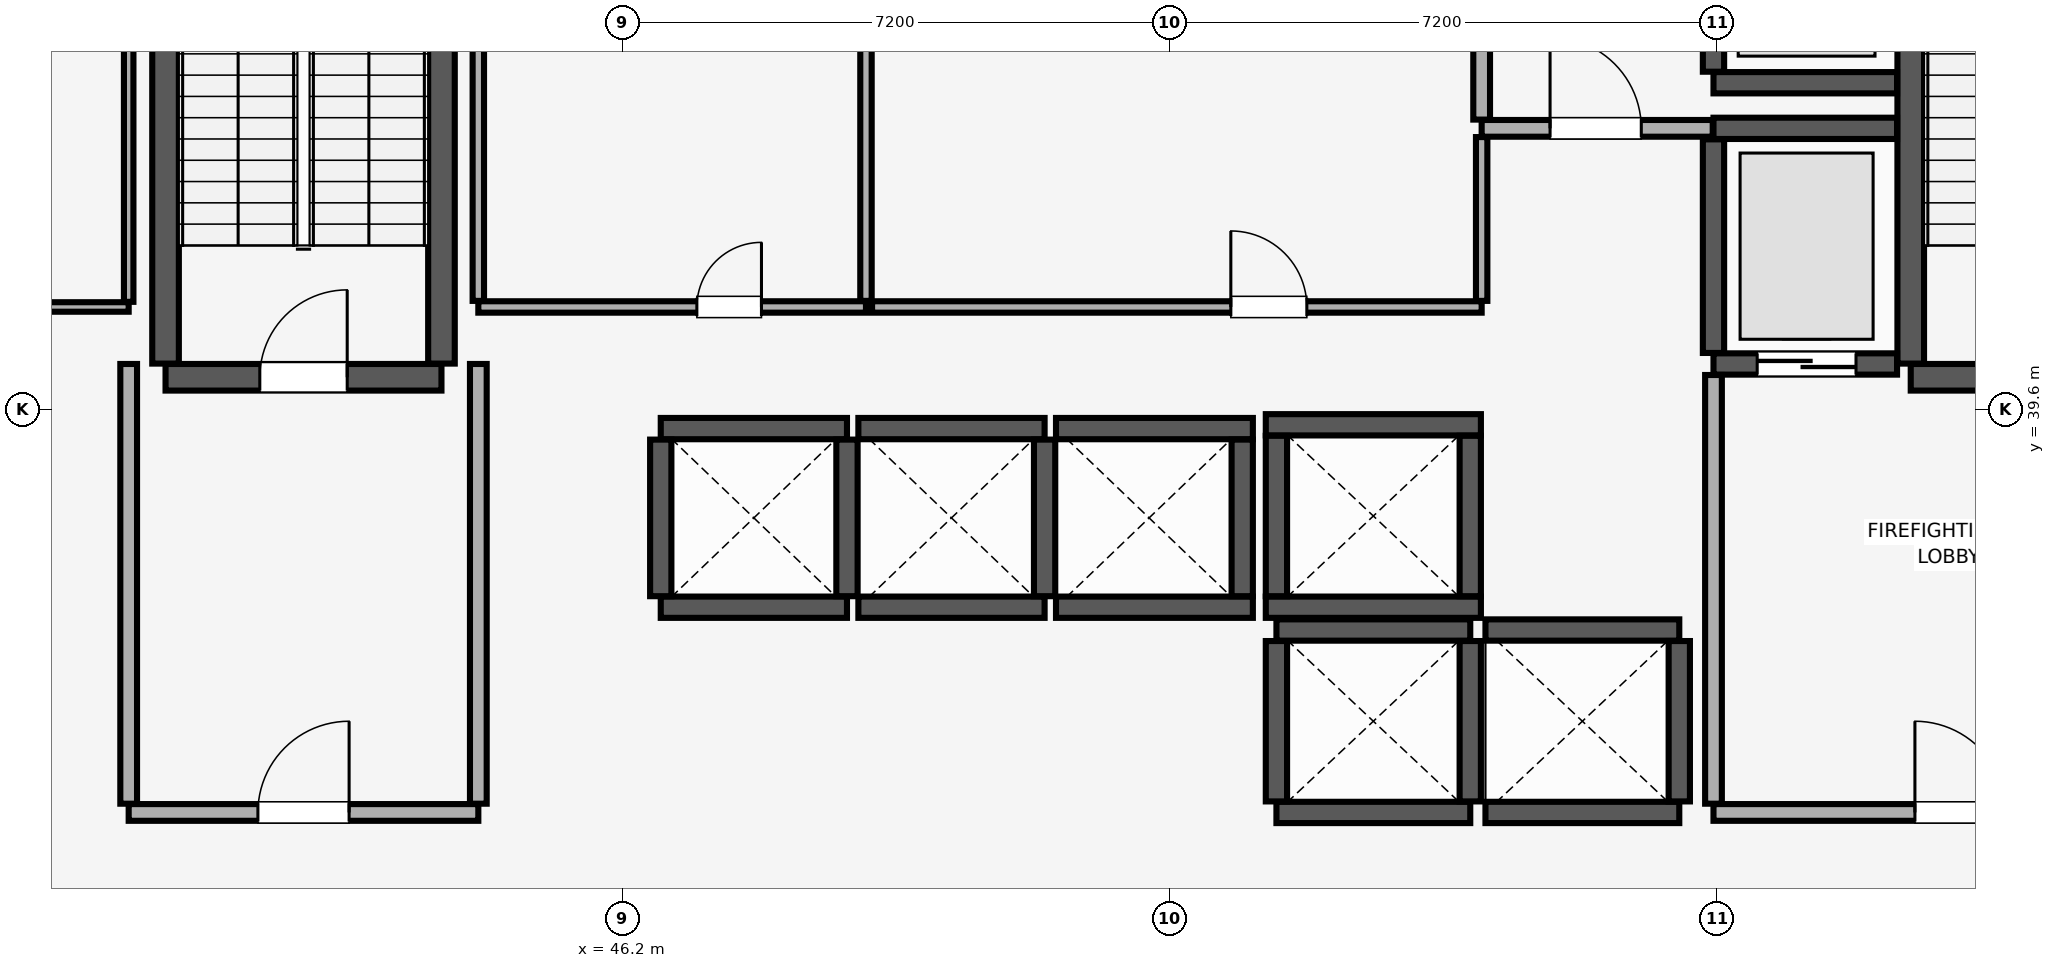
"""IFC4 building model, lengths in metres.
Left out: names, types, materials, properties, quantities, classifications, styles, units other than length and angle.
Written with IfcOpenShell. Run it as: python <this file> out.ifc"""

import sys

from ifc_helpers import new_model, si_unit, direction, frame, frame_2d, origin, place, context, subcontext, project, spatial, rectangle, extrude, element, fill, save


model = new_model("IFC4")
c1 = context("Model", 3, precision=1e-05, world=origin(), true_north=direction((0.0, 1.0)))
c2 = subcontext(c1, "Body", "Model", "MODEL_VIEW")
j1 = project(units=[si_unit("LENGTHUNIT", "METRE"), si_unit("PLANEANGLEUNIT", "RADIAN")], contexts=[c1])
p1 = place(None, origin())
s1 = spatial("IfcSite", under=j1, at=p1, CompositionType="ELEMENT")
p2 = place(p1, origin())
s2 = spatial("IfcBuilding", under=s1, at=p2, CompositionType="ELEMENT")
p3 = place(p2, frame((0.0, 0.0, 57.65)))
s3 = spatial("IfcBuildingStorey", under=s2, at=p3, CompositionType="ELEMENT", Elevation=57.65)
p4 = place(p3, frame((40.185, 40.025, 0.0), z_axis=(0.0, 0.0, 1.0), x_axis=(1.0, 0.0, 0.0)))
e1 = element("IfcWall", 1, at=p4, inside=s3, PredefinedType="SHEAR", context=c2, shape_type="SweptSolid", body=[
    extrude(rectangle(XDim=3.63, YDim=0.35, at=frame_2d((1.815, 0.0))), origin(), (0.0, 0.0, 1.0), 3.51),
])
p5 = place(p4, frame((1.24, 0.0, 0.0)))
e2 = element("IfcOpeningElement", 2, at=p5, cuts=e1, PredefinedType="OPENING", context=c2, shape_type="SweptSolid", body=[
    extrude(rectangle(XDim=1.15, YDim=2.15, at=frame_2d((0.575, 1.075))), frame((0.0, 0.185, 0.0), z_axis=(0.0, -1.0, 0.0), x_axis=(1.0, 0.0, 0.0)), (0.0, 0.0, 1.0), 0.37),
])
for number, where, z_axis, x_axis in (
    (3, (40.185, 40.205, 0.0), (0.0, 0.0, 1.0), (0.0, 1.0, 0.0)),
    (4, (43.815, 40.205, 0.0), (0.0, 0.0, 1.0), (0.0, 1.0, 0.0)),
):
    element("IfcWall", number, at=place(p3, frame(where, z_axis=z_axis, x_axis=x_axis)), inside=s3, PredefinedType="SHEAR", context=c2, shape_type="SweptSolid", body=[
        extrude(rectangle(XDim=8.09, YDim=0.35, at=frame_2d((4.045, 0.0))), origin(), (0.0, 0.0, 1.0), 3.51),
    ])
p6 = place(p3, frame((63.145, 40.025, 0.0), z_axis=(0.0, 0.0, 1.0), x_axis=(1.0, 0.0, 0.0)))
e5 = element("IfcWall", 5, at=p6, inside=s3, PredefinedType="SHEAR", context=c2, shape_type="SweptSolid", body=[
    extrude(rectangle(XDim=4.1, YDim=0.35, at=frame_2d((2.05, 0.0))), origin(), (0.0, 0.0, 1.0), 3.51),
])
p7 = place(p6, frame((1.24, 0.0, 0.0)))
e6 = element("IfcOpeningElement", 6, at=p7, cuts=e5, PredefinedType="OPENING", context=c2, shape_type="SweptSolid", body=[
    extrude(rectangle(XDim=1.15, YDim=2.15, at=frame_2d((0.575, 1.075))), frame((0.0, 0.185, 0.0), z_axis=(0.0, -1.0, 0.0), x_axis=(1.0, 0.0, 0.0)), (0.0, 0.0, 1.0), 0.37),
])
p8 = place(p3, frame((63.145, 40.205, 0.0), z_axis=(0.0, 0.0, 1.0), x_axis=(0.0, 1.0, 0.0)))
e7 = element("IfcWall", 7, at=p8, inside=s3, PredefinedType="SHEAR", context=c2, shape_type="SweptSolid", body=[
    extrude(rectangle(XDim=8.09, YDim=0.35, at=frame_2d((4.045, 0.0))), origin(), (0.0, 0.0, 1.0), 3.51),
])
for number, where, z_axis, x_axis in (
    (8, (46.7, 37.0, 0.0), (0.0, 0.0, 1.0), (1.0, 0.0, 0.0)),
    (9, (46.7, 39.35, 0.0), (0.0, 0.0, 1.0), (1.0, 0.0, 0.0)),
):
    element("IfcWall", number, at=place(p3, frame(where, z_axis=z_axis, x_axis=x_axis)), inside=s3, PredefinedType="SHEAR", context=c2, shape_type="SweptSolid", body=[
        extrude(rectangle(XDim=2.45, YDim=0.28, at=frame_2d((1.225, 0.0))), origin(), (0.0, 0.0, 1.0), 3.51),
    ])
for number, where, z_axis, x_axis in (
    (10, (46.7, 37.145, 0.0), (0.0, 0.0, 1.0), (0.0, 1.0, 0.0)),
    (11, (49.15, 37.145, 0.0), (0.0, 0.0, 1.0), (0.0, 1.0, 0.0)),
):
    element("IfcWall", number, at=place(p3, frame(where, z_axis=z_axis, x_axis=x_axis)), inside=s3, PredefinedType="SHEAR", context=c2, shape_type="SweptSolid", body=[
        extrude(rectangle(XDim=2.06, YDim=0.28, at=frame_2d((1.03, 0.0))), origin(), (0.0, 0.0, 1.0), 3.51),
    ])
for number, where, z_axis, x_axis in (
    (12, (49.3, 37.0, 0.0), (0.0, 0.0, 1.0), (1.0, 0.0, 0.0)),
    (13, (49.3, 39.35, 0.0), (0.0, 0.0, 1.0), (1.0, 0.0, 0.0)),
):
    element("IfcWall", number, at=place(p3, frame(where, z_axis=z_axis, x_axis=x_axis)), inside=s3, PredefinedType="SHEAR", context=c2, shape_type="SweptSolid", body=[
        extrude(rectangle(XDim=2.45, YDim=0.28, at=frame_2d((1.225, 0.0))), origin(), (0.0, 0.0, 1.0), 3.51),
    ])
p9 = place(p3, frame((51.75, 37.145, 0.0), z_axis=(0.0, 0.0, 1.0), x_axis=(0.0, 1.0, 0.0)))
e14 = element("IfcWall", 14, at=p9, inside=s3, PredefinedType="SHEAR", context=c2, shape_type="SweptSolid", body=[
    extrude(rectangle(XDim=2.06, YDim=0.28, at=frame_2d((1.03, 0.0))), origin(), (0.0, 0.0, 1.0), 3.51),
])
for number, where, z_axis, x_axis in (
    (15, (51.9, 37.0, 0.0), (0.0, 0.0, 1.0), (1.0, 0.0, 0.0)),
    (16, (51.9, 39.35, 0.0), (0.0, 0.0, 1.0), (1.0, 0.0, 0.0)),
):
    element("IfcWall", number, at=place(p3, frame(where, z_axis=z_axis, x_axis=x_axis)), inside=s3, PredefinedType="SHEAR", context=c2, shape_type="SweptSolid", body=[
        extrude(rectangle(XDim=2.59, YDim=0.28, at=frame_2d((1.295, 0.0))), origin(), (0.0, 0.0, 1.0), 3.51),
    ])
p10 = place(p3, frame((54.35, 37.145, 0.0), z_axis=(0.0, 0.0, 1.0), x_axis=(0.0, 1.0, 0.0)))
e17 = element("IfcWall", 17, at=p10, inside=s3, PredefinedType="SHEAR", context=c2, shape_type="SweptSolid", body=[
    extrude(rectangle(XDim=2.06, YDim=0.28, at=frame_2d((1.03, 0.0))), origin(), (0.0, 0.0, 1.0), 3.51),
])
for number, where, z_axis, x_axis in (
    (18, (54.8, 34.3, 0.0), (0.0, 0.0, 1.0), (1.0, 0.0, 0.0)),
    (19, (54.8, 36.7, 0.0), (0.0, 0.0, 1.0), (1.0, 0.0, 0.0)),
):
    element("IfcWall", number, at=place(p3, frame(where, z_axis=z_axis, x_axis=x_axis)), inside=s3, PredefinedType="SHEAR", context=c2, shape_type="SweptSolid", body=[
        extrude(rectangle(XDim=2.55, YDim=0.28, at=frame_2d((1.275, 0.0))), origin(), (0.0, 0.0, 1.0), 3.51),
    ])
for number, where, z_axis, x_axis in (
    (20, (54.8, 34.445, 0.0), (0.0, 0.0, 1.0), (0.0, 1.0, 0.0)),
    (21, (57.35, 34.445, 0.0), (0.0, 0.0, 1.0), (0.0, 1.0, 0.0)),
):
    element("IfcWall", number, at=place(p3, frame(where, z_axis=z_axis, x_axis=x_axis)), inside=s3, PredefinedType="SHEAR", context=c2, shape_type="SweptSolid", body=[
        extrude(rectangle(XDim=2.11, YDim=0.28, at=frame_2d((1.055, 0.0))), origin(), (0.0, 0.0, 1.0), 3.51),
    ])
for number, where, z_axis, x_axis in (
    (22, (57.55, 34.3, 0.0), (0.0, 0.0, 1.0), (1.0, 0.0, 0.0)),
    (23, (57.55, 36.7, 0.0), (0.0, 0.0, 1.0), (1.0, 0.0, 0.0)),
):
    element("IfcWall", number, at=place(p3, frame(where, z_axis=z_axis, x_axis=x_axis)), inside=s3, PredefinedType="SHEAR", context=c2, shape_type="SweptSolid", body=[
        extrude(rectangle(XDim=2.55, YDim=0.28, at=frame_2d((1.275, 0.0))), origin(), (0.0, 0.0, 1.0), 3.51),
    ])
p11 = place(p3, frame((60.1, 34.445, 0.0), z_axis=(0.0, 0.0, 1.0), x_axis=(0.0, 1.0, 0.0)))
e24 = element("IfcWall", 24, at=p11, inside=s3, PredefinedType="SHEAR", context=c2, shape_type="SweptSolid", body=[
    extrude(rectangle(XDim=2.11, YDim=0.28, at=frame_2d((1.055, 0.0))), origin(), (0.0, 0.0, 1.0), 3.51),
])
for number, where, z_axis, x_axis in (
    (25, (54.66, 37.0, 0.0), (0.0, 0.0, 1.0), (1.0, 0.0, 0.0)),
    (26, (54.66, 39.4, 0.0), (0.0, 0.0, 1.0), (1.0, 0.0, 0.0)),
):
    element("IfcWall", number, at=place(p3, frame(where, z_axis=z_axis, x_axis=x_axis)), inside=s3, PredefinedType="SHEAR", context=c2, shape_type="SweptSolid", body=[
        extrude(rectangle(XDim=2.83, YDim=0.28, at=frame_2d((1.415, 0.0))), origin(), (0.0, 0.0, 1.0), 3.51),
    ])
for number, where, z_axis, x_axis in (
    (27, (54.8, 37.145, 0.0), (0.0, 0.0, 1.0), (0.0, 1.0, 0.0)),
    (28, (57.35, 37.145, 0.0), (0.0, 0.0, 1.0), (0.0, 1.0, 0.0)),
):
    element("IfcWall", number, at=place(p3, frame(where, z_axis=z_axis, x_axis=x_axis)), inside=s3, PredefinedType="SHEAR", context=c2, shape_type="SweptSolid", body=[
        extrude(rectangle(XDim=2.11, YDim=0.28, at=frame_2d((1.055, 0.0))), origin(), (0.0, 0.0, 1.0), 3.51),
    ])
p12 = place(p3, frame((60.55, 40.2, 0.0), z_axis=(0.0, 0.0, 1.0), x_axis=(1.0, 0.0, 0.0)))
e29 = element("IfcWall", 29, at=p12, inside=s3, PredefinedType="SHEAR", context=c2, shape_type="SweptSolid", body=[
    extrude(rectangle(XDim=2.415, YDim=0.28, at=frame_2d((1.208, 0.0))), origin(), (0.0, 0.0, 1.0), 3.51),
])
p13 = place(p12, frame((0.575, 0.0, 0.0)))
e30 = element("IfcOpeningElement", 30, at=p13, cuts=e29, PredefinedType="OPENING", context=c2, shape_type="SweptSolid", body=[
    extrude(rectangle(XDim=1.3, YDim=2.3, at=frame_2d((0.65, 1.15))), frame((0.0, 0.15, 0.0), z_axis=(0.0, -1.0, 0.0), x_axis=(1.0, 0.0, 0.0)), (0.0, 0.0, 1.0), 0.3),
])
p14 = place(p3, frame((60.55, 43.3, 0.0), z_axis=(0.0, 0.0, 1.0), x_axis=(1.0, 0.0, 0.0)))
e31 = element("IfcWall", 31, at=p14, inside=s3, PredefinedType="SHEAR", context=c2, shape_type="SweptSolid", body=[
    extrude(rectangle(XDim=2.415, YDim=0.28, at=frame_2d((1.208, 0.0))), origin(), (0.0, 0.0, 1.0), 3.51),
])
p15 = place(p3, frame((60.55, 40.345, 0.0), z_axis=(0.0, 0.0, 1.0), x_axis=(0.0, 1.0, 0.0)))
e32 = element("IfcWall", 32, at=p15, inside=s3, PredefinedType="SHEAR", context=c2, shape_type="SweptSolid", body=[
    extrude(rectangle(XDim=2.81, YDim=0.28, at=frame_2d((1.405, 0.0))), origin(), (0.0, 0.0, 1.0), 3.51),
])
p16 = place(p3, frame((60.55, 43.9, 0.0), z_axis=(0.0, 0.0, 1.0), x_axis=(1.0, 0.0, 0.0)))
e33 = element("IfcWall", 33, at=p16, inside=s3, PredefinedType="SHEAR", context=c2, shape_type="SweptSolid", body=[
    extrude(rectangle(XDim=2.415, YDim=0.28, at=frame_2d((1.208, 0.0))), origin(), (0.0, 0.0, 1.0), 3.51),
])
p17 = place(p3, frame((60.55, 44.045, 0.0), z_axis=(0.0, 0.0, 1.0), x_axis=(0.0, 1.0, 0.0)))
e34 = element("IfcWall", 34, at=p17, inside=s3, PredefinedType="SHEAR", context=c2, shape_type="SweptSolid", body=[
    extrude(rectangle(XDim=3.11, YDim=0.28, at=frame_2d((1.555, 0.0))), origin(), (0.0, 0.0, 1.0), 3.51),
])
p18 = place(p17, frame((0.905, 0.0, 0.0)))
e35 = element("IfcOpeningElement", 35, at=p18, cuts=e34, PredefinedType="OPENING", context=c2, shape_type="SweptSolid", body=[
    extrude(rectangle(XDim=1.3, YDim=2.3, at=frame_2d((0.65, 1.15))), frame((0.0, 0.15, 0.0), z_axis=(0.0, -1.0, 0.0), x_axis=(1.0, 0.0, 0.0)), (0.0, 0.0, 1.0), 0.3),
])
p19 = place(p3, frame((60.55, 34.3, 0.0), z_axis=(0.0, 0.0, 1.0), x_axis=(1.0, 0.0, 0.0)))
e36 = element("IfcWall", 36, at=p19, inside=s3, PredefinedType="PARTITIONING", context=c2, shape_type="SweptSolid", body=[
    extrude(rectangle(XDim=6.05, YDim=0.22, at=frame_2d((3.025, 0.0))), origin(), (0.0, 0.0, 1.0), 3.51),
])
p20 = place(p19, frame((2.65, 0.0, 0.0)))
e37 = element("IfcOpeningElement", 37, at=p20, cuts=e36, PredefinedType="OPENING", context=c2, shape_type="SweptSolid", body=[
    extrude(rectangle(XDim=1.2, YDim=2.15, at=frame_2d((0.6, 1.075))), frame((0.0, 0.12, 0.0), z_axis=(0.0, -1.0, 0.0), x_axis=(1.0, 0.0, 0.0)), (0.0, 0.0, 1.0), 0.24),
])
p21 = place(p3, frame((60.55, 34.415, 0.0), z_axis=(0.0, 0.0, 1.0), x_axis=(0.0, 1.0, 0.0)))
e38 = element("IfcWall", 38, at=p21, inside=s3, PredefinedType="PARTITIONING", context=c2, shape_type="SweptSolid", body=[
    extrude(rectangle(XDim=5.64, YDim=0.22, at=frame_2d((2.82, 0.0))), origin(), (0.0, 0.0, 1.0), 3.51),
])
p22 = place(p3, frame((39.7, 34.3, 0.0), z_axis=(0.0, 0.0, 1.0), x_axis=(1.0, 0.0, 0.0)))
e39 = element("IfcWall", 39, at=p22, inside=s3, PredefinedType="PARTITIONING", context=c2, shape_type="SweptSolid", body=[
    extrude(rectangle(XDim=4.6, YDim=0.22, at=frame_2d((2.3, 0.0))), origin(), (0.0, 0.0, 1.0), 3.51),
])
p23 = place(p22, frame((1.7, 0.0, 0.0)))
e40 = element("IfcOpeningElement", 40, at=p23, cuts=e39, PredefinedType="OPENING", context=c2, shape_type="SweptSolid", body=[
    extrude(rectangle(XDim=1.2, YDim=2.15, at=frame_2d((0.6, 1.075))), frame((0.0, 0.12, 0.0), z_axis=(0.0, -1.0, 0.0), x_axis=(1.0, 0.0, 0.0)), (0.0, 0.0, 1.0), 0.24),
])
for number, where, z_axis, x_axis in (
    (41, (39.7, 34.415, 0.0), (0.0, 0.0, 1.0), (0.0, 1.0, 0.0)),
    (42, (44.3, 34.415, 0.0), (0.0, 0.0, 1.0), (0.0, 1.0, 0.0)),
):
    element("IfcWall", number, at=place(p3, frame(where, z_axis=z_axis, x_axis=x_axis)), inside=s3, PredefinedType="PARTITIONING", context=c2, shape_type="SweptSolid", body=[
        extrude(rectangle(XDim=5.785, YDim=0.22, at=frame_2d((2.893, 0.0))), origin(), (0.0, 0.0, 1.0), 3.51),
    ])
p24 = place(p3, frame((57.5, 43.3, 0.0), z_axis=(0.0, 0.0, 1.0), x_axis=(1.0, 0.0, 0.0)))
e43 = element("IfcWall", 43, at=p24, inside=s3, PredefinedType="PARTITIONING", context=c2, shape_type="SweptSolid", body=[
    extrude(rectangle(XDim=3.04, YDim=0.22, at=frame_2d((1.52, 0.0))), origin(), (0.0, 0.0, 1.0), 3.51),
])
p25 = place(p24, frame((0.9, 0.0, 0.0)))
e44 = element("IfcOpeningElement", 44, at=p25, cuts=e43, PredefinedType="OPENING", context=c2, shape_type="SweptSolid", body=[
    extrude(rectangle(XDim=1.2, YDim=2.15, at=frame_2d((0.6, 1.075))), frame((0.0, 0.12, 0.0), z_axis=(0.0, -1.0, 0.0), x_axis=(1.0, 0.0, 0.0)), (0.0, 0.0, 1.0), 0.24),
])
p26 = place(p3, frame((57.5, 43.415, 0.0), z_axis=(0.0, 0.0, 1.0), x_axis=(0.0, 1.0, 0.0)))
e45 = element("IfcWall", 45, at=p26, inside=s3, PredefinedType="PARTITIONING", context=c2, shape_type="SweptSolid", body=[
    extrude(rectangle(XDim=5.435, YDim=0.22, at=frame_2d((2.718, 0.0))), origin(), (0.0, 0.0, 1.0), 3.51),
])
p27 = place(p3, frame((36.11, 40.95, 0.0), z_axis=(0.0, 0.0, 1.0), x_axis=(1.0, 0.0, 0.0)))
e46 = element("IfcWall", 46, at=p27, inside=s3, PredefinedType="PARTITIONING", context=c2, shape_type="SweptSolid", body=[
    extrude(rectangle(XDim=3.59, YDim=0.125, at=frame_2d((1.795, 0.0))), origin(), (0.0, 0.0, 1.0), 3.51),
])
p28 = place(p27, frame((1.34, 0.0, 0.0)))
e47 = element("IfcOpeningElement", 47, at=p28, cuts=e46, PredefinedType="OPENING", context=c2, shape_type="SweptSolid", body=[
    extrude(rectangle(XDim=0.9, YDim=2.1, at=frame_2d((0.45, 1.05))), frame((0.0, 0.073, 0.0), z_axis=(0.0, -1.0, 0.0), x_axis=(1.0, 0.0, 0.0)), (0.0, 0.0, 1.0), 0.145),
])
p29 = place(p3, frame((39.7, 41.018, 0.0), z_axis=(0.0, 0.0, 1.0), x_axis=(0.0, 1.0, 0.0)))
e48 = element("IfcWall", 48, at=p29, inside=s3, PredefinedType="PARTITIONING", context=c2, shape_type="SweptSolid", body=[
    extrude(rectangle(XDim=3.715, YDim=0.125, at=frame_2d((1.857, 0.0))), origin(), (0.0, 0.0, 1.0), 3.51),
])
p30 = place(p3, frame((44.3, 40.95, 0.0), z_axis=(0.0, 0.0, 1.0), x_axis=(1.0, 0.0, 0.0)))
e49 = element("IfcWall", 49, at=p30, inside=s3, PredefinedType="PARTITIONING", context=c2, shape_type="SweptSolid", body=[
    extrude(rectangle(XDim=5.1, YDim=0.15, at=frame_2d((2.55, 0.0))), origin(), (0.0, 0.0, 1.0), 3.51),
])
p31 = place(p30, frame((2.875, 0.0, 0.0)))
e50 = element("IfcOpeningElement", 50, at=p31, cuts=e49, PredefinedType="OPENING", context=c2, shape_type="SweptSolid", body=[
    extrude(rectangle(XDim=0.85, YDim=2.1, at=frame_2d((0.425, 1.05))), frame((0.0, 0.085, 0.0), z_axis=(0.0, -1.0, 0.0), x_axis=(1.0, 0.0, 0.0)), (0.0, 0.0, 1.0), 0.17),
])
for number, where, z_axis, x_axis in (
    (51, (44.3, 41.03, 0.0), (0.0, 0.0, 1.0), (0.0, 1.0, 0.0)),
    (52, (49.4, 41.03, 0.0), (0.0, 0.0, 1.0), (0.0, 1.0, 0.0)),
):
    element("IfcWall", number, at=place(p3, frame(where, z_axis=z_axis, x_axis=x_axis)), inside=s3, PredefinedType="PARTITIONING", context=c2, shape_type="SweptSolid", body=[
        extrude(rectangle(XDim=7.82, YDim=0.15, at=frame_2d((3.91, 0.0))), origin(), (0.0, 0.0, 1.0), 3.51),
    ])
p32 = place(p3, frame((49.48, 40.95, 0.0), z_axis=(0.0, 0.0, 1.0), x_axis=(1.0, 0.0, 0.0)))
e53 = element("IfcWall", 53, at=p32, inside=s3, PredefinedType="PARTITIONING", context=c2, shape_type="SweptSolid", body=[
    extrude(rectangle(XDim=8.02, YDim=0.15, at=frame_2d((4.01, 0.0))), origin(), (0.0, 0.0, 1.0), 3.51),
])
p33 = place(p32, frame((4.72, 0.0, 0.0)))
e54 = element("IfcOpeningElement", 54, at=p33, cuts=e53, PredefinedType="OPENING", context=c2, shape_type="SweptSolid", body=[
    extrude(rectangle(XDim=1.0, YDim=2.15, at=frame_2d((0.5, 1.075))), frame((0.0, 0.085, 0.0), z_axis=(0.0, -1.0, 0.0), x_axis=(1.0, 0.0, 0.0)), (0.0, 0.0, 1.0), 0.17),
])
p34 = place(p3, frame((57.5, 41.03, 0.0), z_axis=(0.0, 0.0, 1.0), x_axis=(0.0, 1.0, 0.0)))
e55 = element("IfcWall", 55, at=p34, inside=s3, PredefinedType="PARTITIONING", context=c2, shape_type="SweptSolid", body=[
    extrude(rectangle(XDim=2.155, YDim=0.15, at=frame_2d((1.078, 0.0))), origin(), (0.0, 0.0, 1.0), 3.51),
])
p35 = place(p5, origin())
e56 = element("IfcDoor", 56, at=p35, inside=s3, OperationType="SINGLE_SWING_RIGHT", PredefinedType="DOOR", context=c2, shape_type="SweptSolid", body=[
    extrude(rectangle(XDim=1.15, YDim=2.15, at=frame_2d((0.575, 1.075))), frame((0.0, 0.025, 0.0), z_axis=(0.0, -1.0, 0.0), x_axis=(1.0, 0.0, 0.0)), (0.0, 0.0, 1.0), 0.05),
])
fill(e2, e56)
p36 = place(p13, origin())
e57 = element("IfcDoor", 57, at=p36, inside=s3, OperationType="DOUBLE_DOOR_SLIDING", PredefinedType="DOOR", context=c2, shape_type="SweptSolid", body=[
    extrude(rectangle(XDim=1.3, YDim=2.3, at=frame_2d((0.65, 1.15))), frame((0.0, 0.025, 0.0), z_axis=(0.0, -1.0, 0.0), x_axis=(1.0, 0.0, 0.0)), (0.0, 0.0, 1.0), 0.05),
])
fill(e30, e57)
p37 = place(p20, origin())
e58 = element("IfcDoor", 58, at=p37, inside=s3, OperationType="SINGLE_SWING_LEFT", PredefinedType="DOOR", context=c2, shape_type="SweptSolid", body=[
    extrude(rectangle(XDim=1.2, YDim=2.15, at=frame_2d((0.6, 1.075))), frame((0.0, 0.025, 0.0), z_axis=(0.0, -1.0, 0.0), x_axis=(1.0, 0.0, 0.0)), (0.0, 0.0, 1.0), 0.05),
])
fill(e37, e58)
p38 = place(p23, origin())
e59 = element("IfcDoor", 59, at=p38, inside=s3, OperationType="SINGLE_SWING_RIGHT", PredefinedType="DOOR", context=c2, shape_type="SweptSolid", body=[
    extrude(rectangle(XDim=1.2, YDim=2.15, at=frame_2d((0.6, 1.075))), frame((0.0, 0.025, 0.0), z_axis=(0.0, -1.0, 0.0), x_axis=(1.0, 0.0, 0.0)), (0.0, 0.0, 1.0), 0.05),
])
fill(e40, e59)
p39 = place(p25, origin())
e60 = element("IfcDoor", 60, at=p39, inside=s3, OperationType="SINGLE_SWING_LEFT", PredefinedType="DOOR", context=c2, shape_type="SweptSolid", body=[
    extrude(rectangle(XDim=1.2, YDim=2.15, at=frame_2d((0.6, 1.075))), frame((0.0, 0.025, 0.0), z_axis=(0.0, -1.0, 0.0), x_axis=(1.0, 0.0, 0.0)), (0.0, 0.0, 1.0), 0.05),
])
fill(e44, e60)
p40 = place(p31, origin())
e61 = element("IfcDoor", 61, at=p40, inside=s3, OperationType="SINGLE_SWING_RIGHT", PredefinedType="DOOR", context=c2, shape_type="SweptSolid", body=[
    extrude(rectangle(XDim=0.85, YDim=2.1, at=frame_2d((0.425, 1.05))), frame((0.0, 0.025, 0.0), z_axis=(0.0, -1.0, 0.0), x_axis=(1.0, 0.0, 0.0)), (0.0, 0.0, 1.0), 0.05),
])
fill(e50, e61)
p41 = place(p33, origin())
e62 = element("IfcDoor", 62, at=p41, inside=s3, OperationType="SINGLE_SWING_LEFT", PredefinedType="DOOR", context=c2, shape_type="SweptSolid", body=[
    extrude(rectangle(XDim=1.0, YDim=2.15, at=frame_2d((0.5, 1.075))), frame((0.0, 0.025, 0.0), z_axis=(0.0, -1.0, 0.0), x_axis=(1.0, 0.0, 0.0)), (0.0, 0.0, 1.0), 0.05),
])
fill(e54, e62)
save(model, sys.argv[1])
